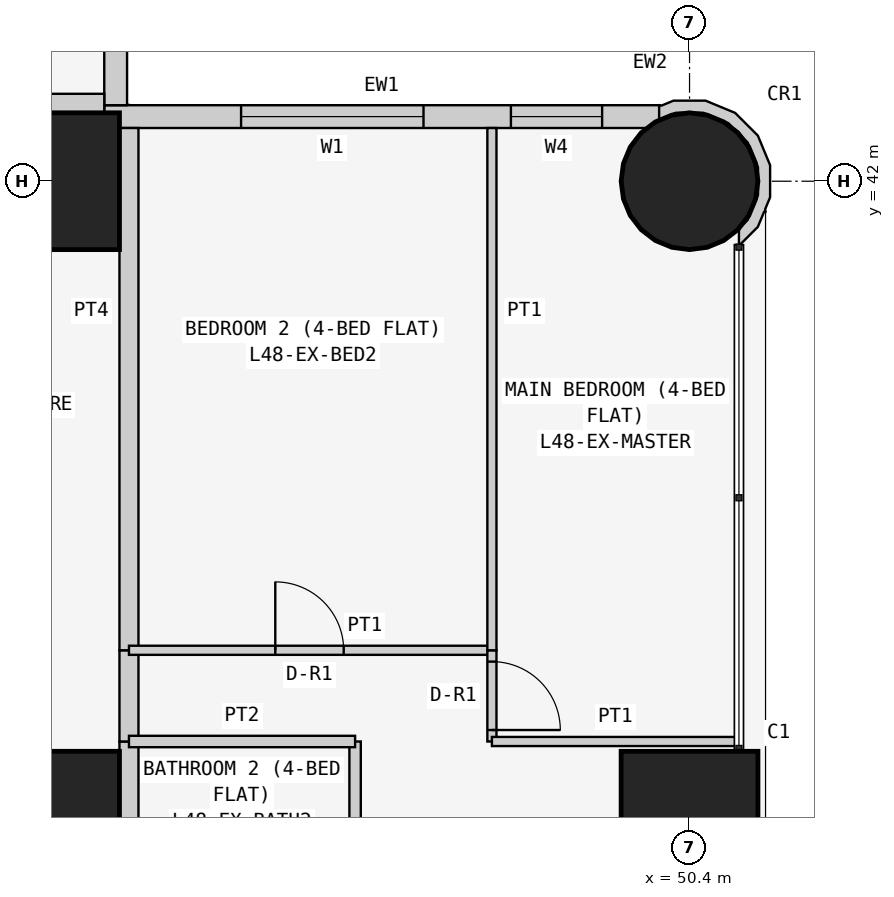
"""IFC4 building model, lengths in metres.
Left out: names, types, materials, properties, quantities, classifications, styles, units other than length and angle.
Written with IfcOpenShell. Run it as: python <this file> out.ifc"""

import sys

from ifc_helpers import new_model, si_unit, direction, frame, frame_2d, origin, origin_2d, place, context, subcontext, project, spatial, polyline, rectangle, circle, outline, extrude, element, fill, save


model = new_model("IFC4")
c1 = context("Model", 3, precision=1e-05, world=origin(), true_north=direction((0.0, 1.0)))
c2 = subcontext(c1, "Body", "Model", "MODEL_VIEW")
j1 = project(units=[si_unit("LENGTHUNIT", "METRE"), si_unit("PLANEANGLEUNIT", "RADIAN")], contexts=[c1])
p1 = place(None, origin())
s1 = spatial("IfcSite", under=j1, at=p1, CompositionType="ELEMENT")
p2 = place(p1, origin())
s2 = spatial("IfcBuilding", under=s1, at=p2, CompositionType="ELEMENT")
p3 = place(p2, frame((0.0, 0.0, 186.9)))
s3 = spatial("IfcBuildingStorey", under=s2, at=p3, CompositionType="ELEMENT", Elevation=186.9)
for number, where, z_axis, x_axis in (
    (1, (42.0, 33.6, 0.0), (0.0, 0.0, 1.0), (1.0, 0.0, 0.0)),
    (2, (42.0, 42.0, 0.0), (0.0, 0.0, 1.0), (1.0, 0.0, 0.0)),
    (3, (50.4, 33.6, 0.0), (0.0, 0.0, 1.0), (1.0, 0.0, 0.0)),
):
    element("IfcColumn", number, at=place(p3, frame(where, z_axis=z_axis, x_axis=x_axis)), inside=s3, PredefinedType="COLUMN", context=c2, shape_type="SweptSolid", body=[
        extrude(rectangle(XDim=1.8, YDim=1.8, at=origin_2d()), origin(), (0.0, 0.0, 1.0), 3.6),
    ])
p4 = place(p3, frame((50.4, 42.0, 0.0), z_axis=(0.0, 0.0, 1.0), x_axis=(1.0, 0.0, 0.0)))
e4 = element("IfcColumn", 4, at=p4, inside=s3, PredefinedType="COLUMN", context=c2, shape_type="SweptSolid", body=[
    extrude(circle(Radius=0.9, at=origin_2d()), origin(), (0.0, 0.0, 1.0), 3.6),
])
p5 = place(p3, frame((50.0, 42.85, 0.0), z_axis=(0.0, 0.0, 1.0), x_axis=(-1.0, 0.0, 0.0)))
e5 = element("IfcWall", 5, at=p5, inside=s3, PredefinedType="SOLIDWALL", context=c2, shape_type="SweptSolid", body=[
    extrude(rectangle(XDim=7.3, YDim=0.3, at=frame_2d((3.65, 0.0))), origin(), (0.0, 0.0, 1.0), 3.45),
])
p6 = place(p5, frame((3.1, 0.0, 0.9)))
e6 = element("IfcOpeningElement", 6, at=p6, cuts=e5, PredefinedType="OPENING", context=c2, shape_type="SweptSolid", body=[
    extrude(rectangle(XDim=2.4, YDim=1.5, at=frame_2d((1.2, 0.75))), frame((0.0, 0.16, 0.0), z_axis=(0.0, -1.0, 0.0), x_axis=(1.0, 0.0, 0.0)), (0.0, 0.0, 1.0), 0.32),
])
p7 = place(p5, frame((0.75, 0.0, 0.9)))
e7 = element("IfcOpeningElement", 7, at=p7, cuts=e5, PredefinedType="OPENING", context=c2, shape_type="SweptSolid", body=[
    extrude(rectangle(XDim=1.2, YDim=1.5, at=frame_2d((0.6, 0.75))), frame((0.0, 0.16, 0.0), z_axis=(0.0, -1.0, 0.0), x_axis=(1.0, 0.0, 0.0)), (0.0, 0.0, 1.0), 0.32),
])
p8 = place(p3, frame((42.85, 43.0, 0.0), z_axis=(0.0, 0.0, 1.0), x_axis=(0.0, 1.0, 0.0)))
e8 = element("IfcWall", 8, at=p8, inside=s3, PredefinedType="SOLIDWALL", context=c2, shape_type="SweptSolid", body=[
    extrude(rectangle(XDim=7.0, YDim=0.3, at=frame_2d((3.5, 0.0))), origin(), (0.0, 0.0, 1.0), 3.45),
])
p9 = place(p8, frame((1.5, 0.0, 0.9)))
e9 = element("IfcOpeningElement", 9, at=p9, cuts=e8, PredefinedType="OPENING", context=c2, shape_type="SweptSolid", body=[
    extrude(rectangle(XDim=2.4, YDim=1.5, at=frame_2d((1.2, 0.75))), frame((0.0, 0.16, 0.0), z_axis=(0.0, -1.0, 0.0), x_axis=(1.0, 0.0, 0.0)), (0.0, 0.0, 1.0), 0.32),
])
p10 = place(p8, frame((5.05, 0.0, 0.9)))
e10 = element("IfcOpeningElement", 10, at=p10, cuts=e8, PredefinedType="OPENING", context=c2, shape_type="SweptSolid", body=[
    extrude(rectangle(XDim=1.2, YDim=1.5, at=frame_2d((0.6, 0.75))), frame((0.0, 0.16, 0.0), z_axis=(0.0, -1.0, 0.0), x_axis=(1.0, 0.0, 0.0)), (0.0, 0.0, 1.0), 0.32),
])
p11 = place(p3, frame((51.011, 41.233, 0.0), z_axis=(0.0, 0.0, 1.0), x_axis=(0.926129809145, 0.377204953059, 0.0)))
e11 = element("IfcWall", 11, at=p11, inside=s3, PredefinedType="SOLIDWALL", context=c2, shape_type="SweptSolid", body=[
    extrude(outline(polyline([(0.626, 0.345), (0.785, 0.736), (0.782, 1.157), (0.619, 1.546), (0.319, 1.842), (-0.072, 2.002), (-0.24, 2.0), (-0.27, 2.017), (-0.37, 1.841), (-0.102, 1.842), (0.229, 1.707), (0.485, 1.455), (0.624, 1.125), (0.626, 0.766), (0.491, 0.434), (0.239, 0.179), (0.09, 0.117), (0.011, -0.078), (0.025, -0.083), (0.329, 0.045), (0.48, 0.198), (0.499, 0.193), (0.507, 0.225), (0.626, 0.345)])), origin(), (0.0, 0.0, 1.0), 3.45),
])
p12 = place(p3, frame((36.229, 43.025, 0.0), z_axis=(0.0, 0.0, 1.0), x_axis=(1.0, 0.0, 0.0)))
e12 = element("IfcWall", 12, at=p12, inside=s3, PredefinedType="PARTITIONING", context=c2, shape_type="SweptSolid", body=[
    extrude(rectangle(XDim=6.471, YDim=0.25, at=frame_2d((3.235, 0.0))), origin(), (0.0, 0.0, 1.0), 3.45),
])
p13 = place(p3, frame((43.025, 34.629, 0.0), z_axis=(0.0, 0.0, 1.0), x_axis=(0.0, -1.0, 0.0)))
e13 = element("IfcWall", 13, at=p13, inside=s3, PredefinedType="PARTITIONING", context=c2, shape_type="SweptSolid", body=[
    extrude(rectangle(XDim=2.629, YDim=0.25, at=frame_2d((1.314, 0.0))), origin(), (0.0, 0.0, 1.0), 3.45),
])
p14 = place(p3, frame((43.025, 35.829, 0.0), z_axis=(0.0, 0.0, 1.0), x_axis=(0.0, -1.0, 0.0)))
e14 = element("IfcWall", 14, at=p14, inside=s3, PredefinedType="PARTITIONING", context=c2, shape_type="SweptSolid", body=[
    extrude(rectangle(XDim=1.2, YDim=0.25, at=frame_2d((0.6, 0.0))), origin(), (0.0, 0.0, 1.0), 3.45),
])
p15 = place(p3, frame((43.025, 42.7, 0.0), z_axis=(0.0, 0.0, 1.0), x_axis=(0.0, -1.0, 0.0)))
e15 = element("IfcWall", 15, at=p15, inside=s3, PredefinedType="PARTITIONING", context=c2, shape_type="SweptSolid", body=[
    extrude(rectangle(XDim=6.871, YDim=0.25, at=frame_2d((3.436, 0.0))), origin(), (0.0, 0.0, 1.0), 3.45),
])
p16 = place(p3, frame((46.0, 32.0, 0.0), z_axis=(0.0, 0.0, 1.0), x_axis=(0.0, 1.0, 0.0)))
e16 = element("IfcWall", 16, at=p16, inside=s3, PredefinedType="PARTITIONING", context=c2, shape_type="SweptSolid", body=[
    extrude(rectangle(XDim=2.629, YDim=0.15, at=frame_2d((1.314, 0.0))), origin(), (0.0, 0.0, 1.0), 3.45),
])
p17 = place(p3, frame((46.0, 34.629, 0.0), z_axis=(0.0, 0.0, 1.0), x_axis=(-1.0, 0.0, 0.0)))
e17 = element("IfcWall", 17, at=p17, inside=s3, PredefinedType="PARTITIONING", context=c2, shape_type="SweptSolid", body=[
    extrude(rectangle(XDim=2.975, YDim=0.15, at=frame_2d((1.488, 0.0))), origin(), (0.0, 0.0, 1.0), 3.45),
])
p18 = place(p3, frame((43.025, 35.829, 0.0), z_axis=(0.0, 0.0, 1.0), x_axis=(1.0, 0.0, 0.0)))
e18 = element("IfcWall", 18, at=p18, inside=s3, PredefinedType="PARTITIONING", context=c2, shape_type="SweptSolid", body=[
    extrude(rectangle(XDim=4.775, YDim=0.12, at=frame_2d((2.388, 0.0))), origin(), (0.0, 0.0, 1.0), 3.45),
])
p19 = place(p18, frame((1.925, 0.0, 0.0)))
e19 = element("IfcOpeningElement", 19, at=p19, cuts=e18, PredefinedType="OPENING", context=c2, shape_type="SweptSolid", body=[
    extrude(rectangle(XDim=0.9, YDim=2.1, at=frame_2d((0.45, 1.05))), frame((0.0, 0.07, 0.0), z_axis=(0.0, -1.0, 0.0), x_axis=(1.0, 0.0, 0.0)), (0.0, 0.0, 1.0), 0.14),
])
p20 = place(p3, frame((47.8, 35.829, 0.0), z_axis=(0.0, 0.0, 1.0), x_axis=(0.0, -1.0, 0.0)))
e20 = element("IfcWall", 20, at=p20, inside=s3, PredefinedType="PARTITIONING", context=c2, shape_type="SweptSolid", body=[
    extrude(rectangle(XDim=1.2, YDim=0.12, at=frame_2d((0.6, 0.0))), origin(), (0.0, 0.0, 1.0), 3.45),
])
p21 = place(p20, frame((0.149, 0.0, 0.0)))
e21 = element("IfcOpeningElement", 21, at=p21, cuts=e20, PredefinedType="OPENING", context=c2, shape_type="SweptSolid", body=[
    extrude(rectangle(XDim=0.9, YDim=2.1, at=frame_2d((0.45, 1.05))), frame((0.0, 0.07, 0.0), z_axis=(0.0, -1.0, 0.0), x_axis=(1.0, 0.0, 0.0)), (0.0, 0.0, 1.0), 0.14),
])
p22 = place(p3, frame((47.8, 34.629, 0.0), z_axis=(0.0, 0.0, 1.0), x_axis=(1.0, 0.0, 0.0)))
e22 = element("IfcWall", 22, at=p22, inside=s3, PredefinedType="PARTITIONING", context=c2, shape_type="SweptSolid", body=[
    extrude(rectangle(XDim=3.25, YDim=0.12, at=frame_2d((1.625, 0.0))), origin(), (0.0, 0.0, 1.0), 3.45),
])
p23 = place(p3, frame((47.8, 35.829, 0.0), z_axis=(0.0, 0.0, 1.0), x_axis=(0.0, 1.0, 0.0)))
e23 = element("IfcWall", 23, at=p23, inside=s3, PredefinedType="PARTITIONING", context=c2, shape_type="SweptSolid", body=[
    extrude(rectangle(XDim=6.871, YDim=0.12, at=frame_2d((3.436, 0.0))), origin(), (0.0, 0.0, 1.0), 3.45),
])
p24 = place(p6, origin())
e24 = element("IfcWindow", 24, at=p24, inside=s3, PartitioningType="SINGLE_PANEL", PredefinedType="WINDOW", context=c2, shape_type="SweptSolid", body=[
    extrude(rectangle(XDim=2.4, YDim=1.5, at=frame_2d((1.2, 0.75))), frame((0.0, 0.03, 0.0), z_axis=(0.0, -1.0, 0.0), x_axis=(1.0, 0.0, 0.0)), (0.0, 0.0, 1.0), 0.06),
])
fill(e6, e24)
p25 = place(p7, origin())
e25 = element("IfcWindow", 25, at=p25, inside=s3, PartitioningType="SINGLE_PANEL", PredefinedType="WINDOW", context=c2, shape_type="SweptSolid", body=[
    extrude(rectangle(XDim=1.2, YDim=1.5, at=frame_2d((0.6, 0.75))), frame((0.0, 0.03, 0.0), z_axis=(0.0, -1.0, 0.0), x_axis=(1.0, 0.0, 0.0)), (0.0, 0.0, 1.0), 0.06),
])
fill(e7, e25)
p26 = place(p19, origin())
e26 = element("IfcDoor", 26, at=p26, inside=s3, OperationType="SINGLE_SWING_LEFT", PredefinedType="DOOR", context=c2, shape_type="SweptSolid", body=[
    extrude(rectangle(XDim=0.9, YDim=2.1, at=frame_2d((0.45, 1.05))), frame((0.0, 0.025, 0.0), z_axis=(0.0, -1.0, 0.0), x_axis=(1.0, 0.0, 0.0)), (0.0, 0.0, 1.0), 0.05),
])
fill(e19, e26)
p27 = place(p21, origin())
e27 = element("IfcDoor", 27, at=p27, inside=s3, OperationType="SINGLE_SWING_RIGHT", PredefinedType="DOOR", context=c2, shape_type="SweptSolid", body=[
    extrude(rectangle(XDim=0.9, YDim=2.1, at=frame_2d((0.45, 1.05))), frame((0.0, 0.025, 0.0), z_axis=(0.0, -1.0, 0.0), x_axis=(1.0, 0.0, 0.0)), (0.0, 0.0, 1.0), 0.05),
])
fill(e21, e27)
save(model, sys.argv[1])
